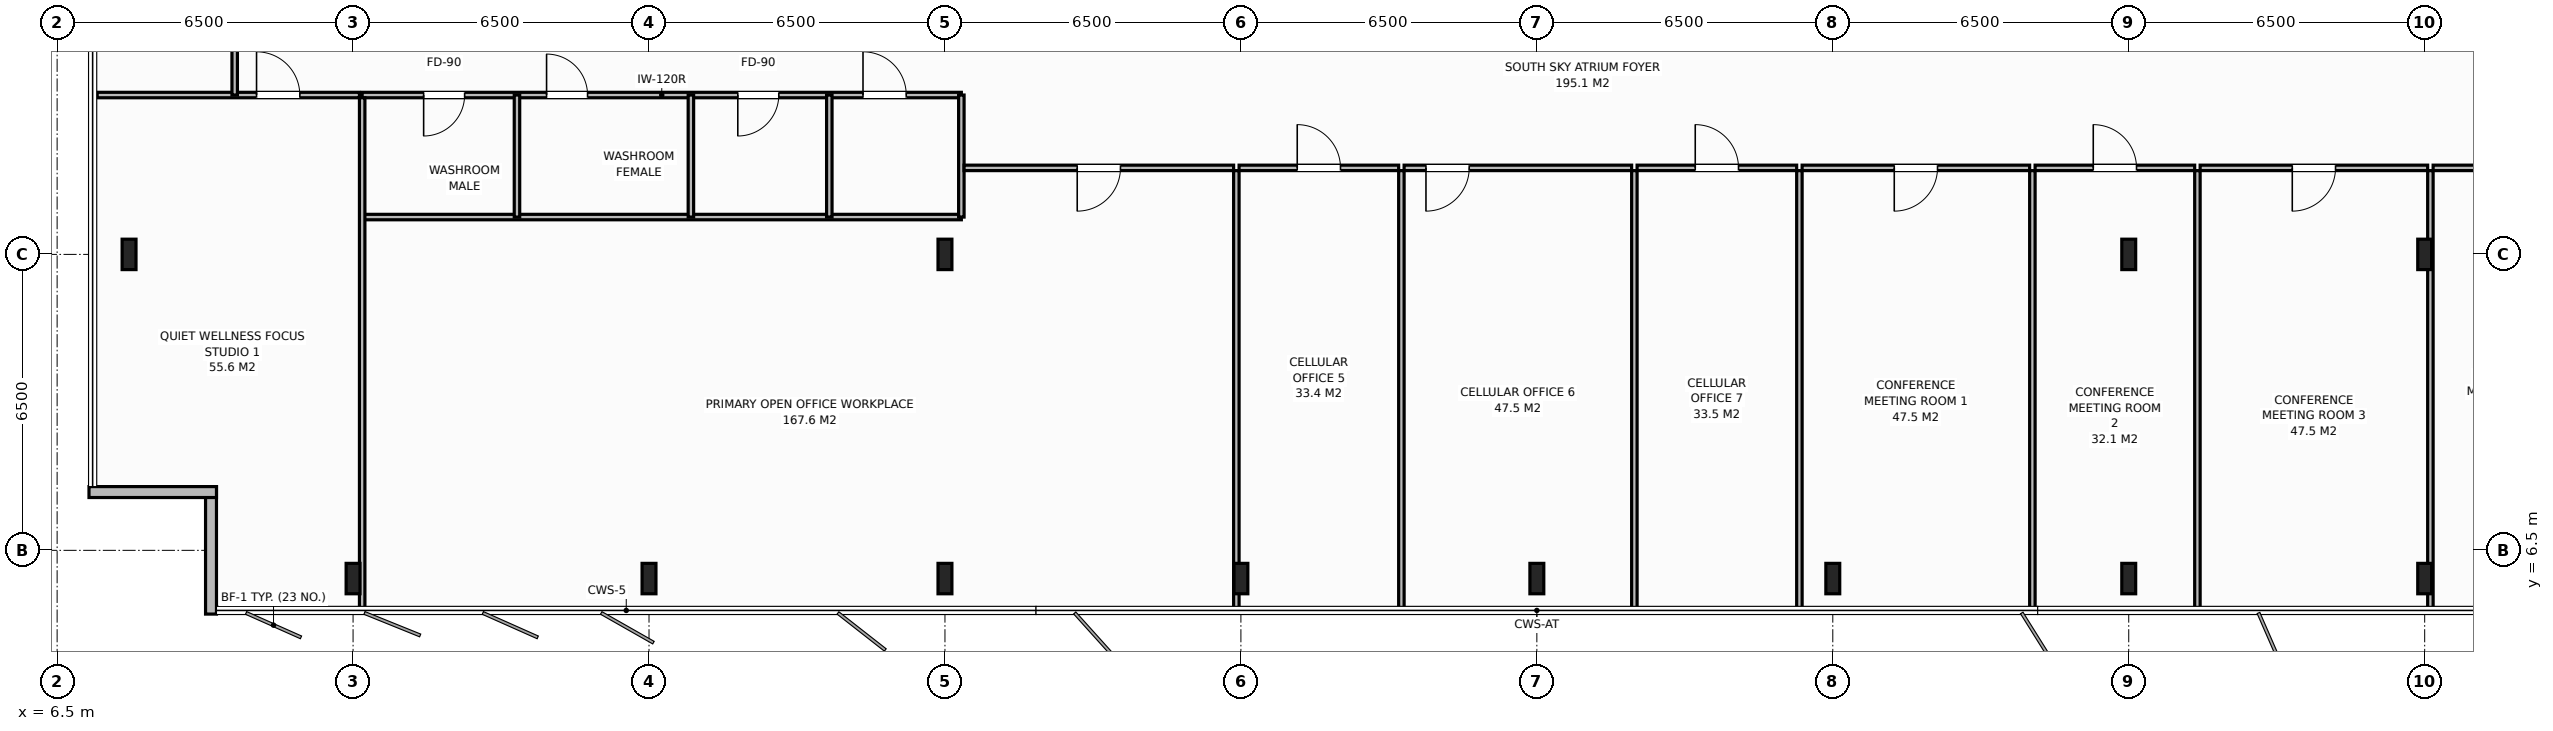
"""IFC4 building model, lengths in metres.
Left out: names, types, materials, properties, quantities, classifications, styles, units other than length and angle.
Written with IfcOpenShell. Run it as: python <this file> out.ifc"""

import sys

from ifc_helpers import new_model, si_unit, direction, frame, frame_2d, origin, origin_2d, place, context, subcontext, project, spatial, rectangle, i_section, extrude, element, fill, save


model = new_model("IFC4")
c1 = context("Model", 3, precision=1e-05, world=origin(), true_north=direction((0.0, 1.0)))
c2 = subcontext(c1, "Body", "Model", "MODEL_VIEW")
j1 = project(units=[si_unit("LENGTHUNIT", "METRE"), si_unit("PLANEANGLEUNIT", "RADIAN")], contexts=[c1])
p1 = place(None, origin())
s1 = spatial("IfcSite", under=j1, at=p1, CompositionType="ELEMENT")
p2 = place(p1, origin())
s2 = spatial("IfcBuilding", under=s1, at=p2, CompositionType="ELEMENT")
p3 = place(p2, frame((0.0, 0.0, 274.6)))
s3 = spatial("IfcBuildingStorey", under=s2, at=p3, CompositionType="ELEMENT", Elevation=274.6)
for number, where, z_axis, x_axis in (
    (1, (58.5, 13.0, 0.0), (0.0, 0.0, 1.0), (1.0, 0.0, 0.0)),
    (2, (26.0, 13.0, 0.0), (0.0, 0.0, 1.0), (1.0, 0.0, 0.0)),
    (3, (52.0, 13.0, 0.0), (0.0, 0.0, 1.0), (1.0, 0.0, 0.0)),
    (4, (13.0, 5.88, 0.0), (0.0, 0.0, 1.0), (1.0, 0.0, 0.0)),
    (5, (19.5, 5.88, 0.0), (0.0, 0.0, 1.0), (1.0, 0.0, 0.0)),
    (6, (26.0, 5.88, 0.0), (0.0, 0.0, 1.0), (1.0, 0.0, 0.0)),
    (7, (32.5, 5.88, 0.0), (0.0, 0.0, 1.0), (1.0, 0.0, 0.0)),
    (8, (39.0, 5.88, 0.0), (0.0, 0.0, 1.0), (1.0, 0.0, 0.0)),
    (9, (45.5, 5.88, 0.0), (0.0, 0.0, 1.0), (1.0, 0.0, 0.0)),
    (10, (52.0, 5.88, 0.0), (0.0, 0.0, 1.0), (1.0, 0.0, 0.0)),
    (11, (58.5, 5.88, 0.0), (0.0, 0.0, 1.0), (1.0, 0.0, 0.0)),
    (12, (8.08, 13.0, 0.0), (0.0, 0.0, 1.0), (1.0, 0.0, 0.0)),
):
    element("IfcColumn", number, at=place(p3, frame(where, z_axis=z_axis, x_axis=x_axis)), inside=s3, PredefinedType="COLUMN", context=c2, shape_type="SweptSolid", body=[
        extrude(i_section(OverallWidth=0.305, OverallDepth=0.668, WebThickness=0.021, FlangeThickness=0.04, at=origin_2d()), origin(), (0.0, 0.0, 1.0), 3.8),
    ])
p4 = place(p3, frame((9.88, 5.1, 0.0), z_axis=(0.0, 0.0, 1.0), x_axis=(0.0, 1.0, 0.0)))
e13 = element("IfcWall", 13, at=p4, inside=s3, PredefinedType="STANDARD", context=c2, shape_type="SweptSolid", body=[
    extrude(rectangle(XDim=2.8, YDim=0.24, at=frame_2d((1.4, 0.0))), origin(), (0.0, 0.0, 1.0), 3.588),
])
p5 = place(p3, frame((10.0, 7.78, 0.0), z_axis=(0.0, 0.0, 1.0), x_axis=(-1.0, 0.0, 0.0)))
e14 = element("IfcWall", 14, at=p5, inside=s3, PredefinedType="STANDARD", context=c2, shape_type="SweptSolid", body=[
    extrude(rectangle(XDim=2.8, YDim=0.24, at=frame_2d((1.4, 0.0))), origin(), (0.0, 0.0, 1.0), 3.588),
])
p6 = place(p3, frame((13.2, 16.5, 0.0), z_axis=(0.0, 0.0, 1.0), x_axis=(1.0, 0.0, 0.0)))
e15 = element("IfcWall", 15, at=p6, inside=s3, PredefinedType="PARTITIONING", context=c2, shape_type="SweptSolid", body=[
    extrude(rectangle(XDim=13.16, YDim=0.12, at=frame_2d((6.58, 0.0))), origin(), (0.0, 0.0, 1.0), 3.588),
])
p7 = place(p6, frame((1.35, 0.0, 0.0)))
e16 = element("IfcOpeningElement", 16, at=p7, cuts=e15, PredefinedType="OPENING", context=c2, shape_type="SweptSolid", body=[
    extrude(rectangle(XDim=0.9, YDim=2.15, at=frame_2d((0.45, 1.075))), frame((0.0, 0.07, 0.0), z_axis=(0.0, -1.0, 0.0), x_axis=(1.0, 0.0, 0.0)), (0.0, 0.0, 1.0), 0.14),
])
p8 = place(p6, frame((4.05, 0.0, 0.0)))
e17 = element("IfcOpeningElement", 17, at=p8, cuts=e15, PredefinedType="OPENING", context=c2, shape_type="SweptSolid", body=[
    extrude(rectangle(XDim=0.9, YDim=2.15, at=frame_2d((0.45, 1.075))), frame((0.0, 0.07, 0.0), z_axis=(0.0, -1.0, 0.0), x_axis=(1.0, 0.0, 0.0)), (0.0, 0.0, 1.0), 0.14),
])
p9 = place(p6, frame((8.25, 0.0, 0.0)))
e18 = element("IfcOpeningElement", 18, at=p9, cuts=e15, PredefinedType="OPENING", context=c2, shape_type="SweptSolid", body=[
    extrude(rectangle(XDim=0.9, YDim=2.15, at=frame_2d((0.45, 1.075))), frame((0.0, 0.07, 0.0), z_axis=(0.0, -1.0, 0.0), x_axis=(1.0, 0.0, 0.0)), (0.0, 0.0, 1.0), 0.14),
])
p10 = place(p6, frame((11.0, 0.0, 0.0)))
e19 = element("IfcOpeningElement", 19, at=p10, cuts=e15, PredefinedType="OPENING", context=c2, shape_type="SweptSolid", body=[
    extrude(rectangle(XDim=0.95, YDim=2.15, at=frame_2d((0.475, 1.075))), frame((0.0, 0.07, 0.0), z_axis=(0.0, -1.0, 0.0), x_axis=(1.0, 0.0, 0.0)), (0.0, 0.0, 1.0), 0.14),
])
p11 = place(p3, frame((13.2, 13.82, 0.0), z_axis=(0.0, 0.0, 1.0), x_axis=(1.0, 0.0, 0.0)))
e20 = element("IfcWall", 20, at=p11, inside=s3, PredefinedType="PARTITIONING", context=c2, shape_type="SweptSolid", body=[
    extrude(rectangle(XDim=13.16, YDim=0.12, at=frame_2d((6.58, 0.0))), origin(), (0.0, 0.0, 1.0), 3.588),
])
for number, where, z_axis, x_axis in (
    (21, (16.6, 13.82, 0.0), (0.0, 0.0, 1.0), (0.0, 1.0, 0.0)),
    (22, (20.42, 13.82, 0.0), (0.0, 0.0, 1.0), (0.0, 1.0, 0.0)),
    (23, (23.46, 13.82, 0.0), (0.0, 0.0, 1.0), (0.0, 1.0, 0.0)),
    (24, (26.36, 13.82, 0.0), (0.0, 0.0, 1.0), (0.0, 1.0, 0.0)),
):
    element("IfcWall", number, at=place(p3, frame(where, z_axis=z_axis, x_axis=x_axis)), inside=s3, PredefinedType="PARTITIONING", context=c2, shape_type="SweptSolid", body=[
        extrude(rectangle(XDim=2.68, YDim=0.12, at=frame_2d((1.34, 0.0))), origin(), (0.0, 0.0, 1.0), 3.588),
    ])
p12 = place(p3, frame((13.2, 5.12, 0.0), z_axis=(0.0, 0.0, 1.0), x_axis=(0.0, 1.0, 0.0)))
e25 = element("IfcWall", 25, at=p12, inside=s3, PredefinedType="PARTITIONING", context=c2, shape_type="SweptSolid", body=[
    extrude(rectangle(XDim=11.32, YDim=0.12, at=frame_2d((5.66, 0.0))), origin(), (0.0, 0.0, 1.0), 2.788),
])
p13 = place(p3, frame((7.38, 16.5, 0.0), z_axis=(0.0, 0.0, 1.0), x_axis=(1.0, 0.0, 0.0)))
e26 = element("IfcWall", 26, at=p13, inside=s3, PredefinedType="PARTITIONING", context=c2, shape_type="SweptSolid", body=[
    extrude(rectangle(XDim=5.76, YDim=0.12, at=frame_2d((2.88, 0.0))), origin(), (0.0, 0.0, 1.0), 3.588),
])
p14 = place(p13, frame((3.5, 0.0, 0.0)))
e27 = element("IfcOpeningElement", 27, at=p14, cuts=e26, PredefinedType="OPENING", context=c2, shape_type="SweptSolid", body=[
    extrude(rectangle(XDim=0.95, YDim=2.15, at=frame_2d((0.475, 1.075))), frame((0.0, 0.07, 0.0), z_axis=(0.0, -1.0, 0.0), x_axis=(1.0, 0.0, 0.0)), (0.0, 0.0, 1.0), 0.14),
])
p15 = place(p3, frame((32.4, 5.12, 0.0), z_axis=(0.0, 0.0, 1.0), x_axis=(0.0, 1.0, 0.0)))
e28 = element("IfcWall", 28, at=p15, inside=s3, PredefinedType="PARTITIONING", context=c2, shape_type="SweptSolid", body=[
    extrude(rectangle(XDim=9.72, YDim=0.12, at=frame_2d((4.86, 0.0))), origin(), (0.0, 0.0, 1.0), 2.788),
])
p16 = place(p3, frame((26.42, 14.9, 0.0), z_axis=(0.0, 0.0, 1.0), x_axis=(1.0, 0.0, 0.0)))
e29 = element("IfcWall", 29, at=p16, inside=s3, PredefinedType="PARTITIONING", context=c2, shape_type="SweptSolid", body=[
    extrude(rectangle(XDim=5.92, YDim=0.12, at=frame_2d((2.96, 0.0))), origin(), (0.0, 0.0, 1.0), 3.588),
])
p17 = place(p16, frame((2.485, 0.0, 0.0)))
e30 = element("IfcOpeningElement", 30, at=p17, cuts=e29, PredefinedType="OPENING", context=c2, shape_type="SweptSolid", body=[
    extrude(rectangle(XDim=0.95, YDim=2.15, at=frame_2d((0.475, 1.075))), frame((0.0, 0.07, 0.0), z_axis=(0.0, -1.0, 0.0), x_axis=(1.0, 0.0, 0.0)), (0.0, 0.0, 1.0), 0.14),
])
p18 = place(p3, frame((36.025, 5.12, 0.0), z_axis=(0.0, 0.0, 1.0), x_axis=(0.0, 1.0, 0.0)))
e31 = element("IfcWall", 31, at=p18, inside=s3, PredefinedType="PARTITIONING", context=c2, shape_type="SweptSolid", body=[
    extrude(rectangle(XDim=9.72, YDim=0.12, at=frame_2d((4.86, 0.0))), origin(), (0.0, 0.0, 1.0), 3.588),
])
p19 = place(p3, frame((32.46, 14.9, 0.0), z_axis=(0.0, 0.0, 1.0), x_axis=(1.0, 0.0, 0.0)))
e32 = element("IfcWall", 32, at=p19, inside=s3, PredefinedType="PARTITIONING", context=c2, shape_type="SweptSolid", body=[
    extrude(rectangle(XDim=3.505, YDim=0.12, at=frame_2d((1.752, 0.0))), origin(), (0.0, 0.0, 1.0), 3.588),
])
p20 = place(p19, frame((1.277, 0.0, 0.0)))
e33 = element("IfcOpeningElement", 33, at=p20, cuts=e32, PredefinedType="OPENING", context=c2, shape_type="SweptSolid", body=[
    extrude(rectangle(XDim=0.95, YDim=2.15, at=frame_2d((0.475, 1.075))), frame((0.0, 0.07, 0.0), z_axis=(0.0, -1.0, 0.0), x_axis=(1.0, 0.0, 0.0)), (0.0, 0.0, 1.0), 0.14),
])
p21 = place(p3, frame((41.142, 5.12, 0.0), z_axis=(0.0, 0.0, 1.0), x_axis=(0.0, 1.0, 0.0)))
e34 = element("IfcWall", 34, at=p21, inside=s3, PredefinedType="PARTITIONING", context=c2, shape_type="SweptSolid", body=[
    extrude(rectangle(XDim=9.72, YDim=0.12, at=frame_2d((4.86, 0.0))), origin(), (0.0, 0.0, 1.0), 3.588),
])
p22 = place(p3, frame((36.085, 14.9, 0.0), z_axis=(0.0, 0.0, 1.0), x_axis=(1.0, 0.0, 0.0)))
e35 = element("IfcWall", 35, at=p22, inside=s3, PredefinedType="PARTITIONING", context=c2, shape_type="SweptSolid", body=[
    extrude(rectangle(XDim=4.997, YDim=0.12, at=frame_2d((2.499, 0.0))), origin(), (0.0, 0.0, 1.0), 3.588),
])
p23 = place(p22, frame((0.48, 0.0, 0.0)))
e36 = element("IfcOpeningElement", 36, at=p23, cuts=e35, PredefinedType="OPENING", context=c2, shape_type="SweptSolid", body=[
    extrude(rectangle(XDim=0.95, YDim=2.15, at=frame_2d((0.475, 1.075))), frame((0.0, 0.07, 0.0), z_axis=(0.0, -1.0, 0.0), x_axis=(1.0, 0.0, 0.0)), (0.0, 0.0, 1.0), 0.14),
])
p24 = place(p3, frame((44.767, 5.12, 0.0), z_axis=(0.0, 0.0, 1.0), x_axis=(0.0, 1.0, 0.0)))
e37 = element("IfcWall", 37, at=p24, inside=s3, PredefinedType="PARTITIONING", context=c2, shape_type="SweptSolid", body=[
    extrude(rectangle(XDim=9.72, YDim=0.12, at=frame_2d((4.86, 0.0))), origin(), (0.0, 0.0, 1.0), 3.588),
])
p25 = place(p3, frame((41.202, 14.9, 0.0), z_axis=(0.0, 0.0, 1.0), x_axis=(1.0, 0.0, 0.0)))
e38 = element("IfcWall", 38, at=p25, inside=s3, PredefinedType="PARTITIONING", context=c2, shape_type="SweptSolid", body=[
    extrude(rectangle(XDim=3.505, YDim=0.12, at=frame_2d((1.752, 0.0))), origin(), (0.0, 0.0, 1.0), 3.588),
])
p26 = place(p25, frame((1.277, 0.0, 0.0)))
e39 = element("IfcOpeningElement", 39, at=p26, cuts=e38, PredefinedType="OPENING", context=c2, shape_type="SweptSolid", body=[
    extrude(rectangle(XDim=0.95, YDim=2.15, at=frame_2d((0.475, 1.075))), frame((0.0, 0.07, 0.0), z_axis=(0.0, -1.0, 0.0), x_axis=(1.0, 0.0, 0.0)), (0.0, 0.0, 1.0), 0.14),
])
p27 = place(p3, frame((49.884, 5.12, 0.0), z_axis=(0.0, 0.0, 1.0), x_axis=(0.0, 1.0, 0.0)))
e40 = element("IfcWall", 40, at=p27, inside=s3, PredefinedType="PARTITIONING", context=c2, shape_type="SweptSolid", body=[
    extrude(rectangle(XDim=9.72, YDim=0.12, at=frame_2d((4.86, 0.0))), origin(), (0.0, 0.0, 1.0), 3.588),
])
p28 = place(p3, frame((44.826, 14.9, 0.0), z_axis=(0.0, 0.0, 1.0), x_axis=(1.0, 0.0, 0.0)))
e41 = element("IfcWall", 41, at=p28, inside=s3, PredefinedType="PARTITIONING", context=c2, shape_type="SweptSolid", body=[
    extrude(rectangle(XDim=4.997, YDim=0.12, at=frame_2d((2.499, 0.0))), origin(), (0.0, 0.0, 1.0), 3.588),
])
p29 = place(p28, frame((2.024, 0.0, 0.0)))
e42 = element("IfcOpeningElement", 42, at=p29, cuts=e41, PredefinedType="OPENING", context=c2, shape_type="SweptSolid", body=[
    extrude(rectangle(XDim=0.95, YDim=2.15, at=frame_2d((0.475, 1.075))), frame((0.0, 0.07, 0.0), z_axis=(0.0, -1.0, 0.0), x_axis=(1.0, 0.0, 0.0)), (0.0, 0.0, 1.0), 0.14),
])
p30 = place(p3, frame((53.508, 5.12, 0.0), z_axis=(0.0, 0.0, 1.0), x_axis=(0.0, 1.0, 0.0)))
e43 = element("IfcWall", 43, at=p30, inside=s3, PredefinedType="PARTITIONING", context=c2, shape_type="SweptSolid", body=[
    extrude(rectangle(XDim=9.72, YDim=0.12, at=frame_2d((4.86, 0.0))), origin(), (0.0, 0.0, 1.0), 3.588),
])
p31 = place(p3, frame((49.944, 14.9, 0.0), z_axis=(0.0, 0.0, 1.0), x_axis=(1.0, 0.0, 0.0)))
e44 = element("IfcWall", 44, at=p31, inside=s3, PredefinedType="PARTITIONING", context=c2, shape_type="SweptSolid", body=[
    extrude(rectangle(XDim=3.505, YDim=0.12, at=frame_2d((1.752, 0.0))), origin(), (0.0, 0.0, 1.0), 3.588),
])
p32 = place(p31, frame((1.277, 0.0, 0.0)))
e45 = element("IfcOpeningElement", 45, at=p32, cuts=e44, PredefinedType="OPENING", context=c2, shape_type="SweptSolid", body=[
    extrude(rectangle(XDim=0.95, YDim=2.15, at=frame_2d((0.475, 1.075))), frame((0.0, 0.07, 0.0), z_axis=(0.0, -1.0, 0.0), x_axis=(1.0, 0.0, 0.0)), (0.0, 0.0, 1.0), 0.14),
])
p33 = place(p3, frame((58.625, 5.12, 0.0), z_axis=(0.0, 0.0, 1.0), x_axis=(0.0, 1.0, 0.0)))
e46 = element("IfcWall", 46, at=p33, inside=s3, PredefinedType="PARTITIONING", context=c2, shape_type="SweptSolid", body=[
    extrude(rectangle(XDim=9.72, YDim=0.12, at=frame_2d((4.86, 0.0))), origin(), (0.0, 0.0, 1.0), 2.788),
])
p34 = place(p3, frame((53.568, 14.9, 0.0), z_axis=(0.0, 0.0, 1.0), x_axis=(1.0, 0.0, 0.0)))
e47 = element("IfcWall", 47, at=p34, inside=s3, PredefinedType="PARTITIONING", context=c2, shape_type="SweptSolid", body=[
    extrude(rectangle(XDim=4.997, YDim=0.12, at=frame_2d((2.499, 0.0))), origin(), (0.0, 0.0, 1.0), 3.588),
])
p35 = place(p34, frame((2.024, 0.0, 0.0)))
e48 = element("IfcOpeningElement", 48, at=p35, cuts=e47, PredefinedType="OPENING", context=c2, shape_type="SweptSolid", body=[
    extrude(rectangle(XDim=0.95, YDim=2.15, at=frame_2d((0.475, 1.075))), frame((0.0, 0.07, 0.0), z_axis=(0.0, -1.0, 0.0), x_axis=(1.0, 0.0, 0.0)), (0.0, 0.0, 1.0), 0.14),
])
p36 = place(p3, frame((58.686, 14.9, 0.0), z_axis=(0.0, 0.0, 1.0), x_axis=(1.0, 0.0, 0.0)))
e49 = element("IfcWall", 49, at=p36, inside=s3, PredefinedType="PARTITIONING", context=c2, shape_type="SweptSolid", body=[
    extrude(rectangle(XDim=3.505, YDim=0.12, at=frame_2d((1.752, 0.0))), origin(), (0.0, 0.0, 1.0), 3.588),
])
p37 = place(p36, frame((1.277, 0.0, 0.0)))
e50 = element("IfcOpeningElement", 50, at=p37, cuts=e49, PredefinedType="OPENING", context=c2, shape_type="SweptSolid", body=[
    extrude(rectangle(XDim=0.95, YDim=2.15, at=frame_2d((0.475, 1.075))), frame((0.0, 0.07, 0.0), z_axis=(0.0, -1.0, 0.0), x_axis=(1.0, 0.0, 0.0)), (0.0, 0.0, 1.0), 0.14),
])
p38 = place(p3, frame((10.4, 16.5, 0.0), z_axis=(0.0, 0.0, 1.0), x_axis=(0.0, 1.0, 0.0)))
e51 = element("IfcWall", 51, at=p38, inside=s3, PredefinedType="PARTITIONING", context=c2, shape_type="SweptSolid", body=[
    extrude(rectangle(XDim=19.0, YDim=0.12, at=frame_2d((9.5, 0.0))), origin(), (0.0, 0.0, 1.0), 3.588),
])
p39 = place(p38, frame((9.025, 0.0, 0.0)))
e52 = element("IfcOpeningElement", 52, at=p39, cuts=e51, PredefinedType="OPENING", context=c2, shape_type="SweptSolid", body=[
    extrude(rectangle(XDim=0.95, YDim=2.15, at=frame_2d((0.475, 1.075))), frame((0.0, 0.07, 0.0), z_axis=(0.0, -1.0, 0.0), x_axis=(1.0, 0.0, 0.0)), (0.0, 0.0, 1.0), 0.14),
])
p40 = place(p7, origin())
e53 = element("IfcDoor", 53, at=p40, inside=s3, OperationType="SINGLE_SWING_RIGHT", PredefinedType="DOOR", context=c2, shape_type="SweptSolid", body=[
    extrude(rectangle(XDim=0.9, YDim=2.15, at=frame_2d((0.45, 1.075))), frame((0.0, 0.025, 0.0), z_axis=(0.0, -1.0, 0.0), x_axis=(1.0, 0.0, 0.0)), (0.0, 0.0, 1.0), 0.05),
])
fill(e16, e53)
p41 = place(p8, origin())
e54 = element("IfcDoor", 54, at=p41, inside=s3, OperationType="SINGLE_SWING_LEFT", PredefinedType="DOOR", context=c2, shape_type="SweptSolid", body=[
    extrude(rectangle(XDim=0.9, YDim=2.15, at=frame_2d((0.45, 1.075))), frame((0.0, 0.025, 0.0), z_axis=(0.0, -1.0, 0.0), x_axis=(1.0, 0.0, 0.0)), (0.0, 0.0, 1.0), 0.05),
])
fill(e17, e54)
p42 = place(p9, origin())
e55 = element("IfcDoor", 55, at=p42, inside=s3, OperationType="SINGLE_SWING_RIGHT", PredefinedType="DOOR", context=c2, shape_type="SweptSolid", body=[
    extrude(rectangle(XDim=0.9, YDim=2.15, at=frame_2d((0.45, 1.075))), frame((0.0, 0.025, 0.0), z_axis=(0.0, -1.0, 0.0), x_axis=(1.0, 0.0, 0.0)), (0.0, 0.0, 1.0), 0.05),
])
fill(e18, e55)
p43 = place(p10, origin())
e56 = element("IfcDoor", 56, at=p43, inside=s3, OperationType="SINGLE_SWING_LEFT", PredefinedType="DOOR", context=c2, shape_type="SweptSolid", body=[
    extrude(rectangle(XDim=0.95, YDim=2.15, at=frame_2d((0.475, 1.075))), frame((0.0, 0.025, 0.0), z_axis=(0.0, -1.0, 0.0), x_axis=(1.0, 0.0, 0.0)), (0.0, 0.0, 1.0), 0.05),
])
fill(e19, e56)
p44 = place(p14, origin())
e57 = element("IfcDoor", 57, at=p44, inside=s3, OperationType="SINGLE_SWING_LEFT", PredefinedType="DOOR", context=c2, shape_type="SweptSolid", body=[
    extrude(rectangle(XDim=0.95, YDim=2.15, at=frame_2d((0.475, 1.075))), frame((0.0, 0.025, 0.0), z_axis=(0.0, -1.0, 0.0), x_axis=(1.0, 0.0, 0.0)), (0.0, 0.0, 1.0), 0.05),
])
fill(e27, e57)
p45 = place(p17, origin())
e58 = element("IfcDoor", 58, at=p45, inside=s3, OperationType="SINGLE_SWING_RIGHT", PredefinedType="DOOR", context=c2, shape_type="SweptSolid", body=[
    extrude(rectangle(XDim=0.95, YDim=2.15, at=frame_2d((0.475, 1.075))), frame((0.0, 0.025, 0.0), z_axis=(0.0, -1.0, 0.0), x_axis=(1.0, 0.0, 0.0)), (0.0, 0.0, 1.0), 0.05),
])
fill(e30, e58)
p46 = place(p20, origin())
e59 = element("IfcDoor", 59, at=p46, inside=s3, OperationType="SINGLE_SWING_LEFT", PredefinedType="DOOR", context=c2, shape_type="SweptSolid", body=[
    extrude(rectangle(XDim=0.95, YDim=2.15, at=frame_2d((0.475, 1.075))), frame((0.0, 0.025, 0.0), z_axis=(0.0, -1.0, 0.0), x_axis=(1.0, 0.0, 0.0)), (0.0, 0.0, 1.0), 0.05),
])
fill(e33, e59)
p47 = place(p23, origin())
e60 = element("IfcDoor", 60, at=p47, inside=s3, OperationType="SINGLE_SWING_RIGHT", PredefinedType="DOOR", context=c2, shape_type="SweptSolid", body=[
    extrude(rectangle(XDim=0.95, YDim=2.15, at=frame_2d((0.475, 1.075))), frame((0.0, 0.025, 0.0), z_axis=(0.0, -1.0, 0.0), x_axis=(1.0, 0.0, 0.0)), (0.0, 0.0, 1.0), 0.05),
])
fill(e36, e60)
p48 = place(p26, origin())
e61 = element("IfcDoor", 61, at=p48, inside=s3, OperationType="SINGLE_SWING_LEFT", PredefinedType="DOOR", context=c2, shape_type="SweptSolid", body=[
    extrude(rectangle(XDim=0.95, YDim=2.15, at=frame_2d((0.475, 1.075))), frame((0.0, 0.025, 0.0), z_axis=(0.0, -1.0, 0.0), x_axis=(1.0, 0.0, 0.0)), (0.0, 0.0, 1.0), 0.05),
])
fill(e39, e61)
p49 = place(p29, origin())
e62 = element("IfcDoor", 62, at=p49, inside=s3, OperationType="SINGLE_SWING_RIGHT", PredefinedType="DOOR", context=c2, shape_type="SweptSolid", body=[
    extrude(rectangle(XDim=0.95, YDim=2.15, at=frame_2d((0.475, 1.075))), frame((0.0, 0.025, 0.0), z_axis=(0.0, -1.0, 0.0), x_axis=(1.0, 0.0, 0.0)), (0.0, 0.0, 1.0), 0.05),
])
fill(e42, e62)
p50 = place(p32, origin())
e63 = element("IfcDoor", 63, at=p50, inside=s3, OperationType="SINGLE_SWING_LEFT", PredefinedType="DOOR", context=c2, shape_type="SweptSolid", body=[
    extrude(rectangle(XDim=0.95, YDim=2.15, at=frame_2d((0.475, 1.075))), frame((0.0, 0.025, 0.0), z_axis=(0.0, -1.0, 0.0), x_axis=(1.0, 0.0, 0.0)), (0.0, 0.0, 1.0), 0.05),
])
fill(e45, e63)
p51 = place(p35, origin())
e64 = element("IfcDoor", 64, at=p51, inside=s3, OperationType="SINGLE_SWING_RIGHT", PredefinedType="DOOR", context=c2, shape_type="SweptSolid", body=[
    extrude(rectangle(XDim=0.95, YDim=2.15, at=frame_2d((0.475, 1.075))), frame((0.0, 0.025, 0.0), z_axis=(0.0, -1.0, 0.0), x_axis=(1.0, 0.0, 0.0)), (0.0, 0.0, 1.0), 0.05),
])
fill(e48, e64)
save(model, sys.argv[1])
